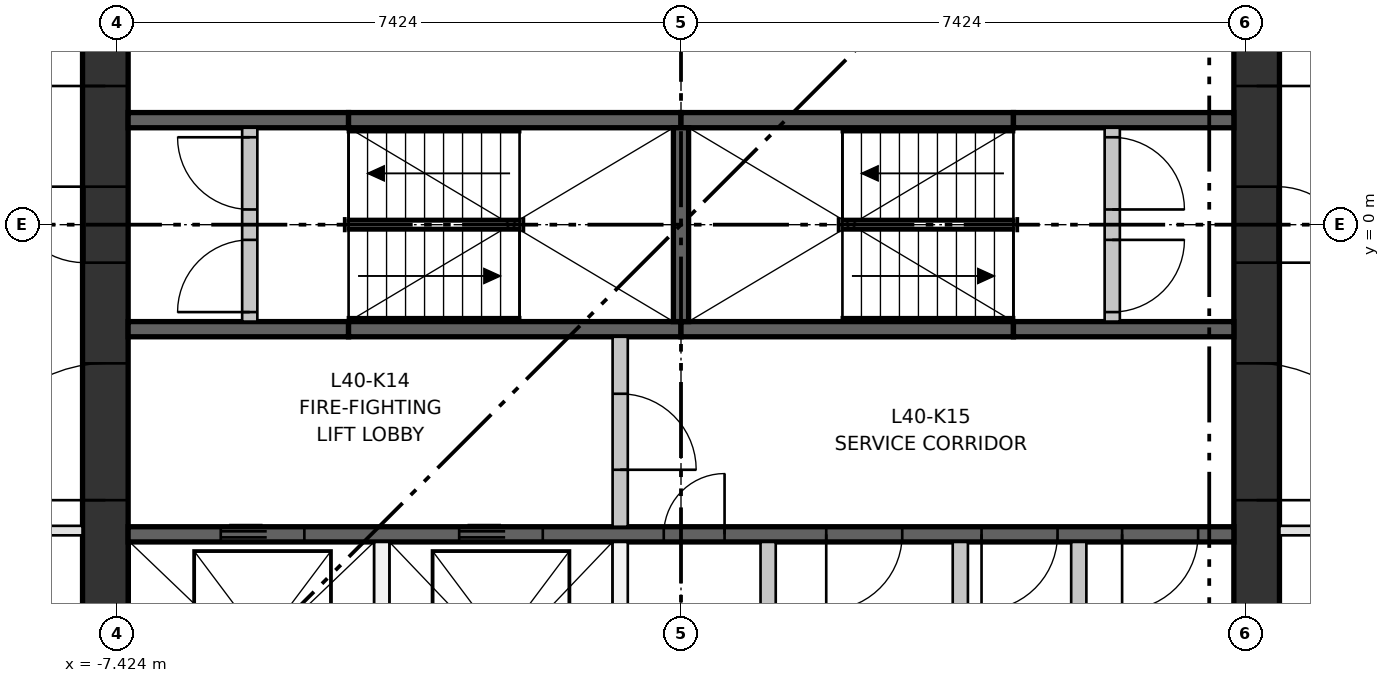
"""IFC4 building model, lengths in metres.
Left out: names, types, materials, properties, quantities, classifications, styles, units other than length and angle.
Written with IfcOpenShell. Run it as: python <this file> out.ifc"""

import sys

from ifc_helpers import new_model, si_unit, direction, frame, frame_2d, origin, place, context, subcontext, project, spatial, rectangle, extrude, element, fill, save


model = new_model("IFC4")
c1 = context("Model", 3, precision=1e-05, world=origin(), true_north=direction((0.0, 1.0)))
c2 = subcontext(c1, "Body", "Model", "MODEL_VIEW")
j1 = project(units=[si_unit("LENGTHUNIT", "METRE"), si_unit("PLANEANGLEUNIT", "RADIAN")], contexts=[c1])
p1 = place(None, origin())
s1 = spatial("IfcSite", under=j1, at=p1, CompositionType="ELEMENT")
p2 = place(p1, origin())
s2 = spatial("IfcBuilding", under=s1, at=p2, CompositionType="ELEMENT")
p3 = place(p2, frame((0.0, 0.0, 151.1)))
s3 = spatial("IfcBuildingStorey", under=s2, at=p3, CompositionType="ELEMENT", Elevation=151.1)
p4 = place(p3, frame((-7.574, -7.274, 0.0), z_axis=(0.0, 0.0, 1.0), x_axis=(0.0, 1.0, 0.0)))
e1 = element("IfcWall", 1, at=p4, inside=s3, PredefinedType="SHEAR", context=c2, shape_type="SweptSolid", body=[
    extrude(rectangle(XDim=14.548, YDim=0.6, at=frame_2d((7.274, 0.0))), origin(), (0.0, 0.0, 1.0), 3.35),
])
p5 = place(p4, frame((6.774, 0.0, 0.0)))
e2 = element("IfcOpeningElement", 2, at=p5, cuts=e1, PredefinedType="OPENING", context=c2, shape_type="SweptSolid", body=[
    extrude(rectangle(XDim=1.0, YDim=2.1, at=frame_2d((0.5, 1.05))), frame((0.0, 0.31, 0.0), z_axis=(0.0, -1.0, 0.0), x_axis=(1.0, 0.0, 0.0)), (0.0, 0.0, 1.0), 0.62),
])
p6 = place(p4, frame((3.649, 0.0, 0.0)))
e3 = element("IfcOpeningElement", 3, at=p6, cuts=e1, PredefinedType="OPENING", context=c2, shape_type="SweptSolid", body=[
    extrude(rectangle(XDim=1.8, YDim=2.1, at=frame_2d((0.9, 1.05))), frame((0.0, 0.31, 0.0), z_axis=(0.0, -1.0, 0.0), x_axis=(1.0, 0.0, 0.0)), (0.0, 0.0, 1.0), 0.62),
])
p7 = place(p4, frame((9.098, 0.0, 0.0)))
e4 = element("IfcOpeningElement", 4, at=p7, cuts=e1, PredefinedType="OPENING", context=c2, shape_type="SweptSolid", body=[
    extrude(rectangle(XDim=1.8, YDim=2.1, at=frame_2d((0.9, 1.05))), frame((0.0, 0.31, 0.0), z_axis=(0.0, -1.0, 0.0), x_axis=(1.0, 0.0, 0.0)), (0.0, 0.0, 1.0), 0.62),
])
p8 = place(p3, frame((7.574, -7.274, 0.0), z_axis=(0.0, 0.0, 1.0), x_axis=(0.0, 1.0, 0.0)))
e5 = element("IfcWall", 5, at=p8, inside=s3, PredefinedType="SHEAR", context=c2, shape_type="SweptSolid", body=[
    extrude(rectangle(XDim=14.548, YDim=0.6, at=frame_2d((7.274, 0.0))), origin(), (0.0, 0.0, 1.0), 3.35),
])
p9 = place(p8, frame((6.774, 0.0, 0.0)))
e6 = element("IfcOpeningElement", 6, at=p9, cuts=e5, PredefinedType="OPENING", context=c2, shape_type="SweptSolid", body=[
    extrude(rectangle(XDim=1.0, YDim=2.1, at=frame_2d((0.5, 1.05))), frame((0.0, 0.31, 0.0), z_axis=(0.0, -1.0, 0.0), x_axis=(1.0, 0.0, 0.0)), (0.0, 0.0, 1.0), 0.62),
])
p10 = place(p8, frame((3.649, 0.0, 0.0)))
e7 = element("IfcOpeningElement", 7, at=p10, cuts=e5, PredefinedType="OPENING", context=c2, shape_type="SweptSolid", body=[
    extrude(rectangle(XDim=1.8, YDim=2.1, at=frame_2d((0.9, 1.05))), frame((0.0, 0.31, 0.0), z_axis=(0.0, -1.0, 0.0), x_axis=(1.0, 0.0, 0.0)), (0.0, 0.0, 1.0), 0.62),
])
p11 = place(p8, frame((9.098, 0.0, 0.0)))
e8 = element("IfcOpeningElement", 8, at=p11, cuts=e5, PredefinedType="OPENING", context=c2, shape_type="SweptSolid", body=[
    extrude(rectangle(XDim=1.8, YDim=2.1, at=frame_2d((0.9, 1.05))), frame((0.0, 0.31, 0.0), z_axis=(0.0, -1.0, 0.0), x_axis=(1.0, 0.0, 0.0)), (0.0, 0.0, 1.0), 0.62),
])
p12 = place(p3, frame((-7.274, -4.074, 0.0), z_axis=(0.0, 0.0, 1.0), x_axis=(1.0, 0.0, 0.0)))
e9 = element("IfcWall", 9, at=p12, inside=s3, PredefinedType="SHEAR", context=c2, shape_type="SweptSolid", body=[
    extrude(rectangle(XDim=14.548, YDim=0.2, at=frame_2d((7.274, 0.0))), origin(), (0.0, 0.0, 1.0), 3.0),
])
p13 = place(p12, frame((1.219, 0.0, 0.0)))
e10 = element("IfcOpeningElement", 10, at=p13, cuts=e9, PredefinedType="OPENING", context=c2, shape_type="SweptSolid", body=[
    extrude(rectangle(XDim=1.1, YDim=2.1, at=frame_2d((0.55, 1.05))), frame((0.0, 0.11, 0.0), z_axis=(0.0, -1.0, 0.0), x_axis=(1.0, 0.0, 0.0)), (0.0, 0.0, 1.0), 0.22),
])
p14 = place(p12, frame((4.355, 0.0, 0.0)))
e11 = element("IfcOpeningElement", 11, at=p14, cuts=e9, PredefinedType="OPENING", context=c2, shape_type="SweptSolid", body=[
    extrude(rectangle(XDim=1.1, YDim=2.1, at=frame_2d((0.55, 1.05))), frame((0.0, 0.11, 0.0), z_axis=(0.0, -1.0, 0.0), x_axis=(1.0, 0.0, 0.0)), (0.0, 0.0, 1.0), 0.22),
])
p15 = place(p12, frame((7.047, 0.0, 0.0)))
e12 = element("IfcOpeningElement", 12, at=p15, cuts=e9, PredefinedType="OPENING", context=c2, shape_type="SweptSolid", body=[
    extrude(rectangle(XDim=0.8, YDim=2.1, at=frame_2d((0.4, 1.05))), frame((0.0, 0.11, 0.0), z_axis=(0.0, -1.0, 0.0), x_axis=(1.0, 0.0, 0.0)), (0.0, 0.0, 1.0), 0.22),
])
p16 = place(p12, frame((9.185, 0.0, 0.0)))
e13 = element("IfcOpeningElement", 13, at=p16, cuts=e9, PredefinedType="OPENING", context=c2, shape_type="SweptSolid", body=[
    extrude(rectangle(XDim=1.0, YDim=2.1, at=frame_2d((0.5, 1.05))), frame((0.0, 0.11, 0.0), z_axis=(0.0, -1.0, 0.0), x_axis=(1.0, 0.0, 0.0)), (0.0, 0.0, 1.0), 0.22),
])
p17 = place(p12, frame((11.228, 0.0, 0.0)))
e14 = element("IfcOpeningElement", 14, at=p17, cuts=e9, PredefinedType="OPENING", context=c2, shape_type="SweptSolid", body=[
    extrude(rectangle(XDim=1.0, YDim=2.1, at=frame_2d((0.5, 1.05))), frame((0.0, 0.11, 0.0), z_axis=(0.0, -1.0, 0.0), x_axis=(1.0, 0.0, 0.0)), (0.0, 0.0, 1.0), 0.22),
])
p18 = place(p12, frame((13.078, 0.0, 0.0)))
e15 = element("IfcOpeningElement", 15, at=p18, cuts=e9, PredefinedType="OPENING", context=c2, shape_type="SweptSolid", body=[
    extrude(rectangle(XDim=1.0, YDim=2.1, at=frame_2d((0.5, 1.05))), frame((0.0, 0.11, 0.0), z_axis=(0.0, -1.0, 0.0), x_axis=(1.0, 0.0, 0.0)), (0.0, 0.0, 1.0), 0.22),
])
p19 = place(p3, frame((-7.274, -1.375, 0.0), z_axis=(0.0, 0.0, 1.0), x_axis=(1.0, 0.0, 0.0)))
e16 = element("IfcWall", 16, at=p19, inside=s3, PredefinedType="SHEAR", context=c2, shape_type="SweptSolid", body=[
    extrude(rectangle(XDim=2.9, YDim=0.2, at=frame_2d((1.45, 0.0))), origin(), (0.0, 0.0, 1.0), 3.0),
])
for number, where, z_axis, x_axis in (
    (17, (-4.374, -1.375, 0.0), (0.0, 0.0, 1.0), (1.0, 0.0, 0.0)),
    (18, (0.0, -1.375, 0.0), (0.0, 0.0, 1.0), (1.0, 0.0, 0.0)),
):
    element("IfcWall", number, at=place(p3, frame(where, z_axis=z_axis, x_axis=x_axis)), inside=s3, PredefinedType="SHEAR", context=c2, shape_type="SweptSolid", body=[
        extrude(rectangle(XDim=4.374, YDim=0.2, at=frame_2d((2.187, 0.0))), origin(), (0.0, 0.0, 1.0), 3.0),
    ])
for number, where, z_axis, x_axis in (
    (19, (4.374, -1.375, 0.0), (0.0, 0.0, 1.0), (1.0, 0.0, 0.0)),
    (20, (-7.274, 1.375, 0.0), (0.0, 0.0, 1.0), (1.0, 0.0, 0.0)),
):
    element("IfcWall", number, at=place(p3, frame(where, z_axis=z_axis, x_axis=x_axis)), inside=s3, PredefinedType="SHEAR", context=c2, shape_type="SweptSolid", body=[
        extrude(rectangle(XDim=2.9, YDim=0.2, at=frame_2d((1.45, 0.0))), origin(), (0.0, 0.0, 1.0), 3.0),
    ])
for number, where, z_axis, x_axis in (
    (21, (-4.374, 1.375, 0.0), (0.0, 0.0, 1.0), (1.0, 0.0, 0.0)),
    (22, (0.0, 1.375, 0.0), (0.0, 0.0, 1.0), (1.0, 0.0, 0.0)),
):
    element("IfcWall", number, at=place(p3, frame(where, z_axis=z_axis, x_axis=x_axis)), inside=s3, PredefinedType="SHEAR", context=c2, shape_type="SweptSolid", body=[
        extrude(rectangle(XDim=4.374, YDim=0.2, at=frame_2d((2.187, 0.0))), origin(), (0.0, 0.0, 1.0), 3.0),
    ])
p20 = place(p3, frame((4.374, 1.375, 0.0), z_axis=(0.0, 0.0, 1.0), x_axis=(1.0, 0.0, 0.0)))
e23 = element("IfcWall", 23, at=p20, inside=s3, PredefinedType="SHEAR", context=c2, shape_type="SweptSolid", body=[
    extrude(rectangle(XDim=2.9, YDim=0.2, at=frame_2d((1.45, 0.0))), origin(), (0.0, 0.0, 1.0), 3.0),
])
p21 = place(p3, frame((0.0, -1.275, 0.0), z_axis=(0.0, 0.0, 1.0), x_axis=(0.0, 1.0, 0.0)))
e24 = element("IfcWall", 24, at=p21, inside=s3, PredefinedType="SHEAR", context=c2, shape_type="SweptSolid", body=[
    extrude(rectangle(XDim=2.55, YDim=0.2, at=frame_2d((1.275, 0.0))), origin(), (0.0, 0.0, 1.0), 3.0),
])
for number, where, z_axis, x_axis in (
    (25, (-3.937, -7.274, 0.0), (0.0, 0.0, 1.0), (0.0, 1.0, 0.0)),
    (26, (-0.8, -7.274, 0.0), (0.0, 0.0, 1.0), (0.0, 1.0, 0.0)),
):
    element("IfcWall", number, at=place(p3, frame(where, z_axis=z_axis, x_axis=x_axis)), inside=s3, PredefinedType="PARTITIONING", context=c2, shape_type="SweptSolid", body=[
        extrude(rectangle(XDim=3.1, YDim=0.2, at=frame_2d((1.55, 0.0))), origin(), (0.0, 0.0, 1.0), 3.0),
    ])
p22 = place(p3, frame((-0.8, -3.974, 0.0), z_axis=(0.0, 0.0, 1.0), x_axis=(0.0, 1.0, 0.0)))
e27 = element("IfcWall", 27, at=p22, inside=s3, PredefinedType="PARTITIONING", context=c2, shape_type="SweptSolid", body=[
    extrude(rectangle(XDim=2.499, YDim=0.2, at=frame_2d((1.25, 0.0))), origin(), (0.0, 0.0, 1.0), 3.0),
])
p23 = place(p22, frame((0.75, 0.0, 0.0)))
e28 = element("IfcOpeningElement", 28, at=p23, cuts=e27, PredefinedType="OPENING", context=c2, shape_type="SweptSolid", body=[
    extrude(rectangle(XDim=1.0, YDim=2.1, at=frame_2d((0.5, 1.05))), frame((0.0, 0.11, 0.0), z_axis=(0.0, -1.0, 0.0), x_axis=(1.0, 0.0, 0.0)), (0.0, 0.0, 1.0), 0.22),
])
for number, where, z_axis, x_axis in (
    (29, (1.146, -7.274, 0.0), (0.0, 0.0, 1.0), (0.0, 1.0, 0.0)),
    (30, (3.675, -7.274, 0.0), (0.0, 0.0, 1.0), (0.0, 1.0, 0.0)),
    (31, (5.233, -7.274, 0.0), (0.0, 0.0, 1.0), (0.0, 1.0, 0.0)),
):
    element("IfcWall", number, at=place(p3, frame(where, z_axis=z_axis, x_axis=x_axis)), inside=s3, PredefinedType="PARTITIONING", context=c2, shape_type="SweptSolid", body=[
        extrude(rectangle(XDim=3.1, YDim=0.2, at=frame_2d((1.55, 0.0))), origin(), (0.0, 0.0, 1.0), 3.0),
    ])
p24 = place(p3, frame((-5.674, -1.275, 0.0), z_axis=(0.0, 0.0, 1.0), x_axis=(0.0, 1.0, 0.0)))
e32 = element("IfcWall", 32, at=p24, inside=s3, PredefinedType="PARTITIONING", context=c2, shape_type="SweptSolid", body=[
    extrude(rectangle(XDim=2.55, YDim=0.2, at=frame_2d((1.275, 0.0))), origin(), (0.0, 0.0, 1.0), 3.0),
])
p25 = place(p24, frame((0.125, 0.0, 0.0)))
e33 = element("IfcOpeningElement", 33, at=p25, cuts=e32, PredefinedType="OPENING", context=c2, shape_type="SweptSolid", body=[
    extrude(rectangle(XDim=0.95, YDim=2.1, at=frame_2d((0.475, 1.05))), frame((0.0, 0.11, 0.0), z_axis=(0.0, -1.0, 0.0), x_axis=(1.0, 0.0, 0.0)), (0.0, 0.0, 1.0), 0.22),
])
p26 = place(p24, frame((1.475, 0.0, 0.0)))
e34 = element("IfcOpeningElement", 34, at=p26, cuts=e32, PredefinedType="OPENING", context=c2, shape_type="SweptSolid", body=[
    extrude(rectangle(XDim=0.95, YDim=2.1, at=frame_2d((0.475, 1.05))), frame((0.0, 0.11, 0.0), z_axis=(0.0, -1.0, 0.0), x_axis=(1.0, 0.0, 0.0)), (0.0, 0.0, 1.0), 0.22),
])
p27 = place(p3, frame((5.674, -1.275, 0.0), z_axis=(0.0, 0.0, 1.0), x_axis=(0.0, 1.0, 0.0)))
e35 = element("IfcWall", 35, at=p27, inside=s3, PredefinedType="PARTITIONING", context=c2, shape_type="SweptSolid", body=[
    extrude(rectangle(XDim=2.55, YDim=0.2, at=frame_2d((1.275, 0.0))), origin(), (0.0, 0.0, 1.0), 3.0),
])
p28 = place(p27, frame((0.125, 0.0, 0.0)))
e36 = element("IfcOpeningElement", 36, at=p28, cuts=e35, PredefinedType="OPENING", context=c2, shape_type="SweptSolid", body=[
    extrude(rectangle(XDim=0.95, YDim=2.1, at=frame_2d((0.475, 1.05))), frame((0.0, 0.11, 0.0), z_axis=(0.0, -1.0, 0.0), x_axis=(1.0, 0.0, 0.0)), (0.0, 0.0, 1.0), 0.22),
])
p29 = place(p27, frame((1.475, 0.0, 0.0)))
e37 = element("IfcOpeningElement", 37, at=p29, cuts=e35, PredefinedType="OPENING", context=c2, shape_type="SweptSolid", body=[
    extrude(rectangle(XDim=0.95, YDim=2.1, at=frame_2d((0.475, 1.05))), frame((0.0, 0.11, 0.0), z_axis=(0.0, -1.0, 0.0), x_axis=(1.0, 0.0, 0.0)), (0.0, 0.0, 1.0), 0.22),
])
p30 = place(p3, frame((12.91, -4.024, 0.0), z_axis=(0.0, 0.0, 1.0), x_axis=(-1.0, 0.0, 0.0)))
e38 = element("IfcWall", 38, at=p30, inside=s3, PredefinedType="PARTITIONING", context=c2, shape_type="SweptSolid", body=[
    extrude(rectangle(XDim=5.036, YDim=0.125, at=frame_2d((2.518, 0.0))), origin(), (0.0, 0.0, 1.0), 3.0),
])
p31 = place(p30, frame((2.0, 0.0, 0.0)))
e39 = element("IfcOpeningElement", 39, at=p31, cuts=e38, PredefinedType="OPENING", context=c2, shape_type="SweptSolid", body=[
    extrude(rectangle(XDim=1.0, YDim=2.1, at=frame_2d((0.5, 1.05))), frame((0.0, 0.073, 0.0), z_axis=(0.0, -1.0, 0.0), x_axis=(1.0, 0.0, 0.0)), (0.0, 0.0, 1.0), 0.145),
])
p32 = place(p3, frame((-7.874, -4.024, 0.0), z_axis=(0.0, 0.0, 1.0), x_axis=(-1.0, 0.0, 0.0)))
e40 = element("IfcWall", 40, at=p32, inside=s3, PredefinedType="PARTITIONING", context=c2, shape_type="SweptSolid", body=[
    extrude(rectangle(XDim=3.771, YDim=0.125, at=frame_2d((1.886, 0.0))), origin(), (0.0, 0.0, 1.0), 3.0),
])
p33 = place(p32, frame((1.2, 0.0, 0.0)))
e41 = element("IfcOpeningElement", 41, at=p33, cuts=e40, PredefinedType="OPENING", context=c2, shape_type="SweptSolid", body=[
    extrude(rectangle(XDim=1.0, YDim=2.1, at=frame_2d((0.5, 1.05))), frame((0.0, 0.073, 0.0), z_axis=(0.0, -1.0, 0.0), x_axis=(1.0, 0.0, 0.0)), (0.0, 0.0, 1.0), 0.145),
])
p34 = place(p13, origin())
e42 = element("IfcDoor", 42, at=p34, inside=s3, OperationType="DOUBLE_DOOR_SLIDING", PredefinedType="DOOR", context=c2, shape_type="SweptSolid", body=[
    extrude(rectangle(XDim=1.1, YDim=2.1, at=frame_2d((0.55, 1.05))), frame((0.0, 0.025, 0.0), z_axis=(0.0, -1.0, 0.0), x_axis=(1.0, 0.0, 0.0)), (0.0, 0.0, 1.0), 0.05),
])
fill(e10, e42)
p35 = place(p14, origin())
e43 = element("IfcDoor", 43, at=p35, inside=s3, OperationType="DOUBLE_DOOR_SLIDING", PredefinedType="DOOR", context=c2, shape_type="SweptSolid", body=[
    extrude(rectangle(XDim=1.1, YDim=2.1, at=frame_2d((0.55, 1.05))), frame((0.0, 0.025, 0.0), z_axis=(0.0, -1.0, 0.0), x_axis=(1.0, 0.0, 0.0)), (0.0, 0.0, 1.0), 0.05),
])
fill(e11, e43)
p36 = place(p25, origin())
e44 = element("IfcDoor", 44, at=p36, inside=s3, OperationType="SINGLE_SWING_LEFT", PredefinedType="DOOR", context=c2, shape_type="SweptSolid", body=[
    extrude(rectangle(XDim=0.95, YDim=2.1, at=frame_2d((0.475, 1.05))), frame((0.0, 0.025, 0.0), z_axis=(0.0, -1.0, 0.0), x_axis=(1.0, 0.0, 0.0)), (0.0, 0.0, 1.0), 0.05),
])
fill(e33, e44)
p37 = place(p26, origin())
e45 = element("IfcDoor", 45, at=p37, inside=s3, OperationType="SINGLE_SWING_RIGHT", PredefinedType="DOOR", context=c2, shape_type="SweptSolid", body=[
    extrude(rectangle(XDim=0.95, YDim=2.1, at=frame_2d((0.475, 1.05))), frame((0.0, 0.025, 0.0), z_axis=(0.0, -1.0, 0.0), x_axis=(1.0, 0.0, 0.0)), (0.0, 0.0, 1.0), 0.05),
])
fill(e34, e45)
p38 = place(p28, frame((0.95, 0.0, 0.0), z_axis=(0.0, 0.0, 1.0), x_axis=(-1.0, 0.0, 0.0)))
e46 = element("IfcDoor", 46, at=p38, inside=s3, OperationType="SINGLE_SWING_RIGHT", PredefinedType="DOOR", context=c2, shape_type="SweptSolid", body=[
    extrude(rectangle(XDim=0.95, YDim=2.1, at=frame_2d((0.475, 1.05))), frame((0.0, 0.025, 0.0), z_axis=(0.0, -1.0, 0.0), x_axis=(1.0, 0.0, 0.0)), (0.0, 0.0, 1.0), 0.05),
])
fill(e36, e46)
p39 = place(p29, frame((0.95, 0.0, 0.0), z_axis=(0.0, 0.0, 1.0), x_axis=(-1.0, 0.0, 0.0)))
e47 = element("IfcDoor", 47, at=p39, inside=s3, OperationType="SINGLE_SWING_LEFT", PredefinedType="DOOR", context=c2, shape_type="SweptSolid", body=[
    extrude(rectangle(XDim=0.95, YDim=2.1, at=frame_2d((0.475, 1.05))), frame((0.0, 0.025, 0.0), z_axis=(0.0, -1.0, 0.0), x_axis=(1.0, 0.0, 0.0)), (0.0, 0.0, 1.0), 0.05),
])
fill(e37, e47)
p40 = place(p23, frame((1.0, 0.0, 0.0), z_axis=(0.0, 0.0, 1.0), x_axis=(-1.0, 0.0, 0.0)))
e48 = element("IfcDoor", 48, at=p40, inside=s3, OperationType="SINGLE_SWING_LEFT", PredefinedType="DOOR", context=c2, shape_type="SweptSolid", body=[
    extrude(rectangle(XDim=1.0, YDim=2.1, at=frame_2d((0.5, 1.05))), frame((0.0, 0.025, 0.0), z_axis=(0.0, -1.0, 0.0), x_axis=(1.0, 0.0, 0.0)), (0.0, 0.0, 1.0), 0.05),
])
fill(e28, e48)
p41 = place(p15, origin())
e49 = element("IfcDoor", 49, at=p41, inside=s3, OperationType="SINGLE_SWING_RIGHT", PredefinedType="DOOR", context=c2, shape_type="SweptSolid", body=[
    extrude(rectangle(XDim=0.8, YDim=2.1, at=frame_2d((0.4, 1.05))), frame((0.0, 0.025, 0.0), z_axis=(0.0, -1.0, 0.0), x_axis=(1.0, 0.0, 0.0)), (0.0, 0.0, 1.0), 0.05),
])
fill(e12, e49)
p42 = place(p16, frame((1.0, 0.0, 0.0), z_axis=(0.0, 0.0, 1.0), x_axis=(-1.0, 0.0, 0.0)))
e50 = element("IfcDoor", 50, at=p42, inside=s3, OperationType="SINGLE_SWING_LEFT", PredefinedType="DOOR", context=c2, shape_type="SweptSolid", body=[
    extrude(rectangle(XDim=1.0, YDim=2.1, at=frame_2d((0.5, 1.05))), frame((0.0, 0.025, 0.0), z_axis=(0.0, -1.0, 0.0), x_axis=(1.0, 0.0, 0.0)), (0.0, 0.0, 1.0), 0.05),
])
fill(e13, e50)
p43 = place(p17, frame((1.0, 0.0, 0.0), z_axis=(0.0, 0.0, 1.0), x_axis=(-1.0, 0.0, 0.0)))
e51 = element("IfcDoor", 51, at=p43, inside=s3, OperationType="SINGLE_SWING_LEFT", PredefinedType="DOOR", context=c2, shape_type="SweptSolid", body=[
    extrude(rectangle(XDim=1.0, YDim=2.1, at=frame_2d((0.5, 1.05))), frame((0.0, 0.025, 0.0), z_axis=(0.0, -1.0, 0.0), x_axis=(1.0, 0.0, 0.0)), (0.0, 0.0, 1.0), 0.05),
])
fill(e14, e51)
p44 = place(p18, frame((1.0, 0.0, 0.0), z_axis=(0.0, 0.0, 1.0), x_axis=(-1.0, 0.0, 0.0)))
e52 = element("IfcDoor", 52, at=p44, inside=s3, OperationType="SINGLE_SWING_LEFT", PredefinedType="DOOR", context=c2, shape_type="SweptSolid", body=[
    extrude(rectangle(XDim=1.0, YDim=2.1, at=frame_2d((0.5, 1.05))), frame((0.0, 0.025, 0.0), z_axis=(0.0, -1.0, 0.0), x_axis=(1.0, 0.0, 0.0)), (0.0, 0.0, 1.0), 0.05),
])
fill(e15, e52)
p45 = place(p5, origin())
e53 = element("IfcDoor", 53, at=p45, inside=s3, OperationType="SINGLE_SWING_RIGHT", PredefinedType="DOOR", context=c2, shape_type="SweptSolid", body=[
    extrude(rectangle(XDim=1.0, YDim=2.1, at=frame_2d((0.5, 1.05))), frame((0.0, 0.3, 0.0), z_axis=(0.0, -1.0, 0.0), x_axis=(1.0, 0.0, 0.0)), (0.0, 0.0, 1.0), 0.05),
])
fill(e2, e53)
p46 = place(p6, origin())
e54 = element("IfcDoor", 54, at=p46, inside=s3, OperationType="DOUBLE_DOOR_SINGLE_SWING", PredefinedType="DOOR", context=c2, shape_type="SweptSolid", body=[
    extrude(rectangle(XDim=1.8, YDim=2.1, at=frame_2d((0.9, 1.05))), frame((0.0, 0.025, 0.0), z_axis=(0.0, -1.0, 0.0), x_axis=(1.0, 0.0, 0.0)), (0.0, 0.0, 1.0), 0.05),
])
fill(e3, e54)
p47 = place(p7, origin())
e55 = element("IfcDoor", 55, at=p47, inside=s3, OperationType="DOUBLE_DOOR_SINGLE_SWING", PredefinedType="DOOR", context=c2, shape_type="SweptSolid", body=[
    extrude(rectangle(XDim=1.8, YDim=2.1, at=frame_2d((0.9, 1.05))), frame((0.0, 0.025, 0.0), z_axis=(0.0, -1.0, 0.0), x_axis=(1.0, 0.0, 0.0)), (0.0, 0.0, 1.0), 0.05),
])
fill(e4, e55)
p48 = place(p9, frame((1.0, 0.0, 0.0), z_axis=(0.0, 0.0, 1.0), x_axis=(-1.0, 0.0, 0.0)))
e56 = element("IfcDoor", 56, at=p48, inside=s3, OperationType="SINGLE_SWING_LEFT", PredefinedType="DOOR", context=c2, shape_type="SweptSolid", body=[
    extrude(rectangle(XDim=1.0, YDim=2.1, at=frame_2d((0.5, 1.05))), frame((0.0, 0.3, 0.0), z_axis=(0.0, -1.0, 0.0), x_axis=(1.0, 0.0, 0.0)), (0.0, 0.0, 1.0), 0.05),
])
fill(e6, e56)
p49 = place(p10, frame((1.8, 0.0, 0.0), z_axis=(0.0, 0.0, 1.0), x_axis=(-1.0, 0.0, 0.0)))
e57 = element("IfcDoor", 57, at=p49, inside=s3, OperationType="DOUBLE_DOOR_SINGLE_SWING", PredefinedType="DOOR", context=c2, shape_type="SweptSolid", body=[
    extrude(rectangle(XDim=1.8, YDim=2.1, at=frame_2d((0.9, 1.05))), frame((0.0, 0.025, 0.0), z_axis=(0.0, -1.0, 0.0), x_axis=(1.0, 0.0, 0.0)), (0.0, 0.0, 1.0), 0.05),
])
fill(e7, e57)
p50 = place(p11, frame((1.8, 0.0, 0.0), z_axis=(0.0, 0.0, 1.0), x_axis=(-1.0, 0.0, 0.0)))
e58 = element("IfcDoor", 58, at=p50, inside=s3, OperationType="DOUBLE_DOOR_SINGLE_SWING", PredefinedType="DOOR", context=c2, shape_type="SweptSolid", body=[
    extrude(rectangle(XDim=1.8, YDim=2.1, at=frame_2d((0.9, 1.05))), frame((0.0, 0.025, 0.0), z_axis=(0.0, -1.0, 0.0), x_axis=(1.0, 0.0, 0.0)), (0.0, 0.0, 1.0), 0.05),
])
fill(e8, e58)
save(model, sys.argv[1])
